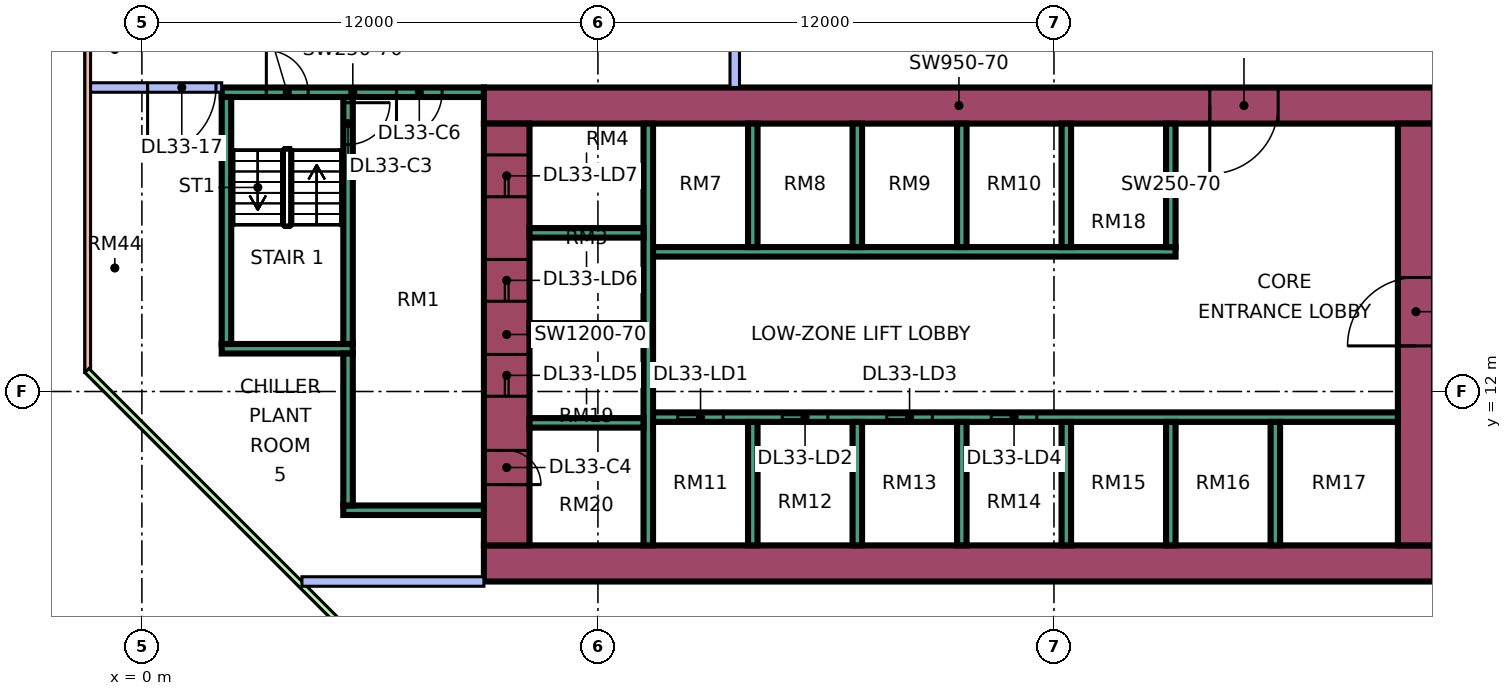
"""IFC4 building model, lengths in metres.
Left out: names, types, materials, properties, quantities, classifications, styles, units other than length and angle.
Written with IfcOpenShell. Run it as: python <this file> out.ifc"""

import sys

from ifc_helpers import new_model, si_unit, direction, frame, frame_2d, origin, place, context, subcontext, project, spatial, rectangle, extrude, element, fill, save


model = new_model("IFC4")
c1 = context("Model", 3, precision=1e-05, world=origin(), true_north=direction((0.0, 1.0)))
c2 = subcontext(c1, "Body", "Model", "MODEL_VIEW")
j1 = project(units=[si_unit("LENGTHUNIT", "METRE"), si_unit("PLANEANGLEUNIT", "RADIAN")], contexts=[c1])
p1 = place(None, origin())
s1 = spatial("IfcSite", under=j1, at=p1, CompositionType="ELEMENT")
p2 = place(p1, origin())
s2 = spatial("IfcBuilding", under=s1, at=p2, CompositionType="ELEMENT")
p3 = place(p2, frame((0.0, 0.0, 140.65)))
s3 = spatial("IfcBuildingStorey", under=s2, at=p3, CompositionType="ELEMENT", Elevation=140.65)
p4 = place(p3, frame((9.0, 7.475, 0.0), z_axis=(0.0, 0.0, 1.0), x_axis=(1.0, 0.0, 0.0)))
e1 = element("IfcWall", 1, at=p4, inside=s3, PredefinedType="SHEAR", context=c2, shape_type="SweptSolid", body=[
    extrude(rectangle(XDim=25.0, YDim=0.95, at=frame_2d((12.5, 0.0))), origin(), (0.0, 0.0, 1.0), 5.5),
])
p5 = place(p3, frame((9.0, 19.525, 0.0), z_axis=(0.0, 0.0, 1.0), x_axis=(1.0, 0.0, 0.0)))
e2 = element("IfcWall", 2, at=p5, inside=s3, PredefinedType="SHEAR", context=c2, shape_type="SweptSolid", body=[
    extrude(rectangle(XDim=25.0, YDim=0.95, at=frame_2d((12.5, 0.0))), origin(), (0.0, 0.0, 1.0), 5.5),
])
p6 = place(p5, frame((19.1, 0.0, 0.0)))
e3 = element("IfcOpeningElement", 3, at=p6, cuts=e2, PredefinedType="OPENING", context=c2, shape_type="SweptSolid", body=[
    extrude(rectangle(XDim=1.8, YDim=2.4, at=frame_2d((0.9, 1.2))), frame((0.0, 0.485, 0.0), z_axis=(0.0, -1.0, 0.0), x_axis=(1.0, 0.0, 0.0)), (0.0, 0.0, 1.0), 0.97),
])
p7 = place(p3, frame((9.6, 7.95, 0.0), z_axis=(0.0, 0.0, 1.0), x_axis=(0.0, 1.0, 0.0)))
e4 = element("IfcWall", 4, at=p7, inside=s3, PredefinedType="SHEAR", context=c2, shape_type="SweptSolid", body=[
    extrude(rectangle(XDim=11.1, YDim=1.2, at=frame_2d((5.55, 0.0))), origin(), (0.0, 0.0, 1.0), 5.5),
])
p8 = place(p7, frame((3.925, 0.0, 0.0)))
e5 = element("IfcOpeningElement", 5, at=p8, cuts=e4, PredefinedType="OPENING", context=c2, shape_type="SweptSolid", body=[
    extrude(rectangle(XDim=1.1, YDim=2.2, at=frame_2d((0.55, 1.1))), frame((0.0, 0.61, 0.0), z_axis=(0.0, -1.0, 0.0), x_axis=(1.0, 0.0, 0.0)), (0.0, 0.0, 1.0), 1.22),
])
p9 = place(p7, frame((6.425, 0.0, 0.0)))
e6 = element("IfcOpeningElement", 6, at=p9, cuts=e4, PredefinedType="OPENING", context=c2, shape_type="SweptSolid", body=[
    extrude(rectangle(XDim=1.1, YDim=2.2, at=frame_2d((0.55, 1.1))), frame((0.0, 0.61, 0.0), z_axis=(0.0, -1.0, 0.0), x_axis=(1.0, 0.0, 0.0)), (0.0, 0.0, 1.0), 1.22),
])
p10 = place(p7, frame((9.175, 0.0, 0.0)))
e7 = element("IfcOpeningElement", 7, at=p10, cuts=e4, PredefinedType="OPENING", context=c2, shape_type="SweptSolid", body=[
    extrude(rectangle(XDim=1.1, YDim=2.2, at=frame_2d((0.55, 1.1))), frame((0.0, 0.61, 0.0), z_axis=(0.0, -1.0, 0.0), x_axis=(1.0, 0.0, 0.0)), (0.0, 0.0, 1.0), 1.22),
])
p11 = place(p7, frame((1.6, 0.0, 0.0)))
e8 = element("IfcOpeningElement", 8, at=p11, cuts=e4, PredefinedType="OPENING", context=c2, shape_type="SweptSolid", body=[
    extrude(rectangle(XDim=0.9, YDim=2.1, at=frame_2d((0.45, 1.05))), frame((0.0, 0.61, 0.0), z_axis=(0.0, -1.0, 0.0), x_axis=(1.0, 0.0, 0.0)), (0.0, 0.0, 1.0), 1.22),
])
p12 = place(p3, frame((33.525, 7.95, 0.0), z_axis=(0.0, 0.0, 1.0), x_axis=(0.0, 1.0, 0.0)))
e9 = element("IfcWall", 9, at=p12, inside=s3, PredefinedType="SHEAR", context=c2, shape_type="SweptSolid", body=[
    extrude(rectangle(XDim=11.1, YDim=0.95, at=frame_2d((5.55, 0.0))), origin(), (0.0, 0.0, 1.0), 5.5),
])
p13 = place(p12, frame((5.25, 0.0, 0.0)))
e10 = element("IfcOpeningElement", 10, at=p13, cuts=e9, PredefinedType="OPENING", context=c2, shape_type="SweptSolid", body=[
    extrude(rectangle(XDim=1.8, YDim=2.4, at=frame_2d((0.9, 1.2))), frame((0.0, 0.485, 0.0), z_axis=(0.0, -1.0, 0.0), x_axis=(1.0, 0.0, 0.0)), (0.0, 0.0, 1.0), 0.97),
])
p14 = place(p3, frame((13.325, 7.95, 0.0), z_axis=(0.0, 0.0, 1.0), x_axis=(0.0, 1.0, 0.0)))
e11 = element("IfcWall", 11, at=p14, inside=s3, PredefinedType="SHEAR", context=c2, shape_type="SweptSolid", body=[
    extrude(rectangle(XDim=11.1, YDim=0.25, at=frame_2d((5.55, 0.0))), origin(), (0.0, 0.0, 1.0), 5.5),
])
p15 = place(p3, frame((13.45, 11.325, 0.0), z_axis=(0.0, 0.0, 1.0), x_axis=(1.0, 0.0, 0.0)))
e12 = element("IfcWall", 12, at=p15, inside=s3, PredefinedType="SHEAR", context=c2, shape_type="SweptSolid", body=[
    extrude(rectangle(XDim=19.6, YDim=0.25, at=frame_2d((9.8, 0.0))), origin(), (0.0, 0.0, 1.0), 5.5),
])
p16 = place(p15, frame((0.65, 0.0, 0.0)))
e13 = element("IfcOpeningElement", 13, at=p16, cuts=e12, PredefinedType="OPENING", context=c2, shape_type="SweptSolid", body=[
    extrude(rectangle(XDim=1.2, YDim=2.2, at=frame_2d((0.6, 1.1))), frame((0.0, 0.135, 0.0), z_axis=(0.0, -1.0, 0.0), x_axis=(1.0, 0.0, 0.0)), (0.0, 0.0, 1.0), 0.27),
])
p17 = place(p15, frame((3.4, 0.0, 0.0)))
e14 = element("IfcOpeningElement", 14, at=p17, cuts=e12, PredefinedType="OPENING", context=c2, shape_type="SweptSolid", body=[
    extrude(rectangle(XDim=1.2, YDim=2.2, at=frame_2d((0.6, 1.1))), frame((0.0, 0.135, 0.0), z_axis=(0.0, -1.0, 0.0), x_axis=(1.0, 0.0, 0.0)), (0.0, 0.0, 1.0), 0.27),
])
p18 = place(p15, frame((6.15, 0.0, 0.0)))
e15 = element("IfcOpeningElement", 15, at=p18, cuts=e12, PredefinedType="OPENING", context=c2, shape_type="SweptSolid", body=[
    extrude(rectangle(XDim=1.2, YDim=2.2, at=frame_2d((0.6, 1.1))), frame((0.0, 0.135, 0.0), z_axis=(0.0, -1.0, 0.0), x_axis=(1.0, 0.0, 0.0)), (0.0, 0.0, 1.0), 0.27),
])
p19 = place(p15, frame((8.9, 0.0, 0.0)))
e16 = element("IfcOpeningElement", 16, at=p19, cuts=e12, PredefinedType="OPENING", context=c2, shape_type="SweptSolid", body=[
    extrude(rectangle(XDim=1.2, YDim=2.2, at=frame_2d((0.6, 1.1))), frame((0.0, 0.135, 0.0), z_axis=(0.0, -1.0, 0.0), x_axis=(1.0, 0.0, 0.0)), (0.0, 0.0, 1.0), 0.27),
])
p20 = place(p3, frame((13.45, 15.675, 0.0), z_axis=(0.0, 0.0, 1.0), x_axis=(1.0, 0.0, 0.0)))
e17 = element("IfcWall", 17, at=p20, inside=s3, PredefinedType="SHEAR", context=c2, shape_type="SweptSolid", body=[
    extrude(rectangle(XDim=13.75, YDim=0.25, at=frame_2d((6.875, 0.0))), origin(), (0.0, 0.0, 1.0), 5.5),
])
for number, where, z_axis, x_axis in (
    (18, (10.2, 11.175, 0.0), (0.0, 0.0, 1.0), (1.0, 0.0, 0.0)),
    (19, (10.2, 13.675, 0.0), (0.0, 0.0, 1.0), (1.0, 0.0, 0.0)),
    (20, (10.2, 16.175, 0.0), (0.0, 0.0, 1.0), (1.0, 0.0, 0.0)),
):
    element("IfcWall", number, at=place(p3, frame(where, z_axis=z_axis, x_axis=x_axis)), inside=s3, PredefinedType="SHEAR", context=c2, shape_type="SweptSolid", body=[
        extrude(rectangle(XDim=3.0, YDim=0.25, at=frame_2d((1.5, 0.0))), origin(), (0.0, 0.0, 1.0), 5.5),
    ])
for number, where, z_axis, x_axis in (
    (21, (16.075, 7.95, 0.0), (0.0, 0.0, 1.0), (0.0, 1.0, 0.0)),
    (22, (18.825, 7.95, 0.0), (0.0, 0.0, 1.0), (0.0, 1.0, 0.0)),
    (23, (21.575, 7.95, 0.0), (0.0, 0.0, 1.0), (0.0, 1.0, 0.0)),
    (24, (24.325, 7.95, 0.0), (0.0, 0.0, 1.0), (0.0, 1.0, 0.0)),
    (25, (27.075, 7.95, 0.0), (0.0, 0.0, 1.0), (0.0, 1.0, 0.0)),
    (26, (29.825, 7.95, 0.0), (0.0, 0.0, 1.0), (0.0, 1.0, 0.0)),
    (27, (16.075, 15.8, 0.0), (0.0, 0.0, 1.0), (0.0, 1.0, 0.0)),
    (28, (18.825, 15.8, 0.0), (0.0, 0.0, 1.0), (0.0, 1.0, 0.0)),
    (29, (21.575, 15.8, 0.0), (0.0, 0.0, 1.0), (0.0, 1.0, 0.0)),
    (30, (24.325, 15.8, 0.0), (0.0, 0.0, 1.0), (0.0, 1.0, 0.0)),
    (31, (27.075, 15.8, 0.0), (0.0, 0.0, 1.0), (0.0, 1.0, 0.0)),
):
    element("IfcWall", number, at=place(p3, frame(where, z_axis=z_axis, x_axis=x_axis)), inside=s3, PredefinedType="SHEAR", context=c2, shape_type="SweptSolid", body=[
        extrude(rectangle(XDim=3.25, YDim=0.25, at=frame_2d((1.625, 0.0))), origin(), (0.0, 0.0, 1.0), 5.5),
    ])
p21 = place(p3, frame((2.1, 19.875, 0.0), z_axis=(0.0, 0.0, 1.0), x_axis=(1.0, 0.0, 0.0)))
e32 = element("IfcWall", 32, at=p21, inside=s3, PredefinedType="SHEAR", context=c2, shape_type="SweptSolid", body=[
    extrude(rectangle(XDim=6.9, YDim=0.25, at=frame_2d((3.45, 0.0))), origin(), (0.0, 0.0, 1.0), 5.5),
])
p22 = place(p21, frame((1.175, 0.0, 0.0)))
e33 = element("IfcOpeningElement", 33, at=p22, cuts=e32, PredefinedType="OPENING", context=c2, shape_type="SweptSolid", body=[
    extrude(rectangle(XDim=1.1, YDim=2.2, at=frame_2d((0.55, 1.1))), frame((0.0, 0.135, 0.0), z_axis=(0.0, -1.0, 0.0), x_axis=(1.0, 0.0, 0.0)), (0.0, 0.0, 1.0), 0.27),
])
p23 = place(p21, frame((4.6, 0.0, 0.0)))
e34 = element("IfcOpeningElement", 34, at=p23, cuts=e32, PredefinedType="OPENING", context=c2, shape_type="SweptSolid", body=[
    extrude(rectangle(XDim=1.2, YDim=2.2, at=frame_2d((0.6, 1.1))), frame((0.0, 0.135, 0.0), z_axis=(0.0, -1.0, 0.0), x_axis=(1.0, 0.0, 0.0)), (0.0, 0.0, 1.0), 0.27),
])
p24 = place(p3, frame((2.1, 13.125, 0.0), z_axis=(0.0, 0.0, 1.0), x_axis=(1.0, 0.0, 0.0)))
e35 = element("IfcWall", 35, at=p24, inside=s3, PredefinedType="SHEAR", context=c2, shape_type="SweptSolid", body=[
    extrude(rectangle(XDim=3.45, YDim=0.25, at=frame_2d((1.725, 0.0))), origin(), (0.0, 0.0, 1.0), 5.5),
])
p25 = place(p3, frame((2.225, 13.25, 0.0), z_axis=(0.0, 0.0, 1.0), x_axis=(0.0, 1.0, 0.0)))
e36 = element("IfcWall", 36, at=p25, inside=s3, PredefinedType="SHEAR", context=c2, shape_type="SweptSolid", body=[
    extrude(rectangle(XDim=6.5, YDim=0.25, at=frame_2d((3.25, 0.0))), origin(), (0.0, 0.0, 1.0), 5.5),
])
p26 = place(p3, frame((5.425, 13.25, 0.0), z_axis=(0.0, 0.0, 1.0), x_axis=(0.0, 1.0, 0.0)))
e37 = element("IfcWall", 37, at=p26, inside=s3, PredefinedType="SHEAR", context=c2, shape_type="SweptSolid", body=[
    extrude(rectangle(XDim=6.5, YDim=0.25, at=frame_2d((3.25, 0.0))), origin(), (0.0, 0.0, 1.0), 5.5),
])
p27 = place(p26, frame((5.25, 0.0, 0.0)))
e38 = element("IfcOpeningElement", 38, at=p27, cuts=e37, PredefinedType="OPENING", context=c2, shape_type="SweptSolid", body=[
    extrude(rectangle(XDim=1.1, YDim=2.2, at=frame_2d((0.55, 1.1))), frame((0.0, 0.135, 0.0), z_axis=(0.0, -1.0, 0.0), x_axis=(1.0, 0.0, 0.0)), (0.0, 0.0, 1.0), 0.27),
])
p28 = place(p3, frame((5.3, 8.875, 0.0), z_axis=(0.0, 0.0, 1.0), x_axis=(1.0, 0.0, 0.0)))
e39 = element("IfcWall", 39, at=p28, inside=s3, PredefinedType="SHEAR", context=c2, shape_type="SweptSolid", body=[
    extrude(rectangle(XDim=3.7, YDim=0.25, at=frame_2d((1.85, 0.0))), origin(), (0.0, 0.0, 1.0), 5.5),
])
p29 = place(p3, frame((5.425, 9.0, 0.0), z_axis=(0.0, 0.0, 1.0), x_axis=(0.0, 1.0, 0.0)))
e40 = element("IfcWall", 40, at=p29, inside=s3, PredefinedType="SHEAR", context=c2, shape_type="SweptSolid", body=[
    extrude(rectangle(XDim=4.0, YDim=0.25, at=frame_2d((2.0, 0.0))), origin(), (0.0, 0.0, 1.0), 5.5),
])
p30 = place(p3, frame((-1.425, 23.925, 0.0), z_axis=(0.0, 0.0, 1.0), x_axis=(0.0, -1.0, 0.0)))
e41 = element("IfcWall", 41, at=p30, inside=s3, PredefinedType="SOLIDWALL", context=c2, shape_type="SweptSolid", body=[
    extrude(rectangle(XDim=11.425, YDim=0.15, at=frame_2d((5.712, 0.0))), origin(), (0.0, 0.0, 1.0), 5.05),
])
p31 = place(p3, frame((-1.447, 12.553, 0.0), z_axis=(0.0, 0.0, 1.0), x_axis=(0.707106781187, -0.707106781187, 0.0)))
e42 = element("IfcWall", 42, at=p31, inside=s3, PredefinedType="SOLIDWALL", context=c2, shape_type="SweptSolid", body=[
    extrude(rectangle(XDim=19.799, YDim=0.15, at=frame_2d((9.899, 0.0))), origin(), (0.0, 0.0, 1.0), 5.05),
])
p32 = place(p31, frame((11.453, 0.0, 0.45)))
e43 = element("IfcOpeningElement", 43, at=p32, cuts=e42, PredefinedType="OPENING", context=c2, shape_type="SweptSolid", body=[
    extrude(rectangle(XDim=3.0, YDim=3.6, at=frame_2d((1.5, 1.8))), frame((0.0, 0.085, 0.0), z_axis=(0.0, -1.0, 0.0), x_axis=(1.0, 0.0, 0.0)), (0.0, 0.0, 1.0), 0.17),
])
p33 = place(p3, frame((-1.35, 20.0, 0.0), z_axis=(0.0, 0.0, 1.0), x_axis=(1.0, 0.0, 0.0)))
e44 = element("IfcWall", 44, at=p33, inside=s3, PredefinedType="PARTITIONING", context=c2, shape_type="SweptSolid", body=[
    extrude(rectangle(XDim=3.45, YDim=0.25, at=frame_2d((1.725, 0.0))), origin(), (0.0, 0.0, 1.0), 5.05),
])
p34 = place(p33, frame((1.5, 0.0, 0.0)))
e45 = element("IfcOpeningElement", 45, at=p34, cuts=e44, PredefinedType="OPENING", context=c2, shape_type="SweptSolid", body=[
    extrude(rectangle(XDim=1.8, YDim=2.1, at=frame_2d((0.9, 1.05))), frame((0.0, 0.135, 0.0), z_axis=(0.0, -1.0, 0.0), x_axis=(1.0, 0.0, 0.0)), (0.0, 0.0, 1.0), 0.27),
])
p35 = place(p3, frame((4.211, 7.0, 0.0), z_axis=(0.0, 0.0, 1.0), x_axis=(1.0, 0.0, 0.0)))
e46 = element("IfcWall", 46, at=p35, inside=s3, PredefinedType="PARTITIONING", context=c2, shape_type="SweptSolid", body=[
    extrude(rectangle(XDim=4.789, YDim=0.25, at=frame_2d((2.395, 0.0))), origin(), (0.0, 0.0, 1.0), 5.05),
])
p36 = place(p3, frame((15.6, 20.0, 0.0), z_axis=(0.0, 0.0, 1.0), x_axis=(0.0, 1.0, 0.0)))
e47 = element("IfcWall", 47, at=p36, inside=s3, PredefinedType="PARTITIONING", context=c2, shape_type="SweptSolid", body=[
    extrude(rectangle(XDim=27.775, YDim=0.25, at=frame_2d((13.887, 0.0))), origin(), (0.0, 0.0, 1.0), 5.05),
])
p37 = place(p36, frame((19.15, 0.0, 0.0)))
e48 = element("IfcOpeningElement", 48, at=p37, cuts=e47, PredefinedType="OPENING", context=c2, shape_type="SweptSolid", body=[
    extrude(rectangle(XDim=1.8, YDim=2.1, at=frame_2d((0.9, 1.05))), frame((0.0, 0.135, 0.0), z_axis=(0.0, -1.0, 0.0), x_axis=(1.0, 0.0, 0.0)), (0.0, 0.0, 1.0), 0.27),
])
p38 = place(p36, frame((24.9, 0.0, 0.0)))
e49 = element("IfcOpeningElement", 49, at=p38, cuts=e47, PredefinedType="OPENING", context=c2, shape_type="SweptSolid", body=[
    extrude(rectangle(XDim=1.8, YDim=2.1, at=frame_2d((0.9, 1.05))), frame((0.0, 0.135, 0.0), z_axis=(0.0, -1.0, 0.0), x_axis=(1.0, 0.0, 0.0)), (0.0, 0.0, 1.0), 0.27),
])
p39 = place(p36, frame((14.65, 0.0, 0.0)))
e50 = element("IfcOpeningElement", 50, at=p39, cuts=e47, PredefinedType="OPENING", context=c2, shape_type="SweptSolid", body=[
    extrude(rectangle(XDim=0.9, YDim=2.1, at=frame_2d((0.45, 1.05))), frame((0.0, 0.135, 0.0), z_axis=(0.0, -1.0, 0.0), x_axis=(1.0, 0.0, 0.0)), (0.0, 0.0, 1.0), 0.27),
])
p40 = place(p36, frame((11.4, 0.0, 0.0)))
e51 = element("IfcOpeningElement", 51, at=p40, cuts=e47, PredefinedType="OPENING", context=c2, shape_type="SweptSolid", body=[
    extrude(rectangle(XDim=0.9, YDim=2.1, at=frame_2d((0.45, 1.05))), frame((0.0, 0.135, 0.0), z_axis=(0.0, -1.0, 0.0), x_axis=(1.0, 0.0, 0.0)), (0.0, 0.0, 1.0), 0.27),
])
p41 = place(p16, origin())
e52 = element("IfcDoor", 52, at=p41, inside=s3, OperationType="DOUBLE_DOOR_SLIDING", PredefinedType="DOOR", context=c2, shape_type="SweptSolid", body=[
    extrude(rectangle(XDim=1.2, YDim=2.2, at=frame_2d((0.6, 1.1))), frame((0.0, 0.025, 0.0), z_axis=(0.0, -1.0, 0.0), x_axis=(1.0, 0.0, 0.0)), (0.0, 0.0, 1.0), 0.05),
])
fill(e13, e52)
p42 = place(p17, origin())
e53 = element("IfcDoor", 53, at=p42, inside=s3, OperationType="DOUBLE_DOOR_SLIDING", PredefinedType="DOOR", context=c2, shape_type="SweptSolid", body=[
    extrude(rectangle(XDim=1.2, YDim=2.2, at=frame_2d((0.6, 1.1))), frame((0.0, 0.025, 0.0), z_axis=(0.0, -1.0, 0.0), x_axis=(1.0, 0.0, 0.0)), (0.0, 0.0, 1.0), 0.05),
])
fill(e14, e53)
p43 = place(p18, origin())
e54 = element("IfcDoor", 54, at=p43, inside=s3, OperationType="DOUBLE_DOOR_SLIDING", PredefinedType="DOOR", context=c2, shape_type="SweptSolid", body=[
    extrude(rectangle(XDim=1.2, YDim=2.2, at=frame_2d((0.6, 1.1))), frame((0.0, 0.025, 0.0), z_axis=(0.0, -1.0, 0.0), x_axis=(1.0, 0.0, 0.0)), (0.0, 0.0, 1.0), 0.05),
])
fill(e15, e54)
p44 = place(p19, origin())
e55 = element("IfcDoor", 55, at=p44, inside=s3, OperationType="DOUBLE_DOOR_SLIDING", PredefinedType="DOOR", context=c2, shape_type="SweptSolid", body=[
    extrude(rectangle(XDim=1.2, YDim=2.2, at=frame_2d((0.6, 1.1))), frame((0.0, 0.025, 0.0), z_axis=(0.0, -1.0, 0.0), x_axis=(1.0, 0.0, 0.0)), (0.0, 0.0, 1.0), 0.05),
])
fill(e16, e55)
p45 = place(p8, origin())
e56 = element("IfcDoor", 56, at=p45, inside=s3, OperationType="DOUBLE_DOOR_SLIDING", PredefinedType="DOOR", context=c2, shape_type="SweptSolid", body=[
    extrude(rectangle(XDim=1.1, YDim=2.2, at=frame_2d((0.55, 1.1))), frame((0.0, 0.025, 0.0), z_axis=(0.0, -1.0, 0.0), x_axis=(1.0, 0.0, 0.0)), (0.0, 0.0, 1.0), 0.05),
])
fill(e5, e56)
p46 = place(p9, origin())
e57 = element("IfcDoor", 57, at=p46, inside=s3, OperationType="DOUBLE_DOOR_SLIDING", PredefinedType="DOOR", context=c2, shape_type="SweptSolid", body=[
    extrude(rectangle(XDim=1.1, YDim=2.2, at=frame_2d((0.55, 1.1))), frame((0.0, 0.025, 0.0), z_axis=(0.0, -1.0, 0.0), x_axis=(1.0, 0.0, 0.0)), (0.0, 0.0, 1.0), 0.05),
])
fill(e6, e57)
p47 = place(p10, origin())
e58 = element("IfcDoor", 58, at=p47, inside=s3, OperationType="DOUBLE_DOOR_SLIDING", PredefinedType="DOOR", context=c2, shape_type="SweptSolid", body=[
    extrude(rectangle(XDim=1.1, YDim=2.2, at=frame_2d((0.55, 1.1))), frame((0.0, 0.025, 0.0), z_axis=(0.0, -1.0, 0.0), x_axis=(1.0, 0.0, 0.0)), (0.0, 0.0, 1.0), 0.05),
])
fill(e7, e58)
p48 = place(p13, origin())
e59 = element("IfcDoor", 59, at=p48, inside=s3, OperationType="DOUBLE_DOOR_SINGLE_SWING", PredefinedType="DOOR", context=c2, shape_type="SweptSolid", body=[
    extrude(rectangle(XDim=1.8, YDim=2.4, at=frame_2d((0.9, 1.2))), frame((0.0, 0.025, 0.0), z_axis=(0.0, -1.0, 0.0), x_axis=(1.0, 0.0, 0.0)), (0.0, 0.0, 1.0), 0.05),
])
fill(e10, e59)
p49 = place(p6, frame((1.8, 0.0, 0.0), z_axis=(0.0, 0.0, 1.0), x_axis=(-1.0, 0.0, 0.0)))
e60 = element("IfcDoor", 60, at=p49, inside=s3, OperationType="DOUBLE_DOOR_SINGLE_SWING", PredefinedType="DOOR", context=c2, shape_type="SweptSolid", body=[
    extrude(rectangle(XDim=1.8, YDim=2.4, at=frame_2d((0.9, 1.2))), frame((0.0, 0.025, 0.0), z_axis=(0.0, -1.0, 0.0), x_axis=(1.0, 0.0, 0.0)), (0.0, 0.0, 1.0), 0.05),
])
fill(e3, e60)
p50 = place(p27, origin())
e61 = element("IfcDoor", 61, at=p50, inside=s3, OperationType="SINGLE_SWING_RIGHT", PredefinedType="DOOR", context=c2, shape_type="SweptSolid", body=[
    extrude(rectangle(XDim=1.1, YDim=2.2, at=frame_2d((0.55, 1.1))), frame((0.0, 0.025, 0.0), z_axis=(0.0, -1.0, 0.0), x_axis=(1.0, 0.0, 0.0)), (0.0, 0.0, 1.0), 0.05),
])
fill(e38, e61)
p51 = place(p11, frame((0.9, 0.0, 0.0), z_axis=(0.0, 0.0, 1.0), x_axis=(-1.0, 0.0, 0.0)))
e62 = element("IfcDoor", 62, at=p51, inside=s3, OperationType="SINGLE_SWING_LEFT", PredefinedType="DOOR", context=c2, shape_type="SweptSolid", body=[
    extrude(rectangle(XDim=0.9, YDim=2.1, at=frame_2d((0.45, 1.05))), frame((0.0, 0.025, 0.0), z_axis=(0.0, -1.0, 0.0), x_axis=(1.0, 0.0, 0.0)), (0.0, 0.0, 1.0), 0.05),
])
fill(e8, e62)
p52 = place(p22, origin())
e63 = element("IfcDoor", 63, at=p52, inside=s3, OperationType="SINGLE_SWING_LEFT", PredefinedType="DOOR", context=c2, shape_type="SweptSolid", body=[
    extrude(rectangle(XDim=1.1, YDim=2.2, at=frame_2d((0.55, 1.1))), frame((0.0, 0.025, 0.0), z_axis=(0.0, -1.0, 0.0), x_axis=(1.0, 0.0, 0.0)), (0.0, 0.0, 1.0), 0.05),
])
fill(e33, e63)
p53 = place(p23, frame((1.2, 0.0, 0.0), z_axis=(0.0, 0.0, 1.0), x_axis=(-1.0, 0.0, 0.0)))
e64 = element("IfcDoor", 64, at=p53, inside=s3, OperationType="SINGLE_SWING_LEFT", PredefinedType="DOOR", context=c2, shape_type="SweptSolid", body=[
    extrude(rectangle(XDim=1.2, YDim=2.2, at=frame_2d((0.6, 1.1))), frame((0.0, 0.025, 0.0), z_axis=(0.0, -1.0, 0.0), x_axis=(1.0, 0.0, 0.0)), (0.0, 0.0, 1.0), 0.05),
])
fill(e34, e64)
p54 = place(p34, frame((1.8, 0.0, 0.0), z_axis=(0.0, 0.0, 1.0), x_axis=(-1.0, 0.0, 0.0)))
e65 = element("IfcDoor", 65, at=p54, inside=s3, OperationType="DOUBLE_DOOR_SINGLE_SWING", PredefinedType="DOOR", context=c2, shape_type="SweptSolid", body=[
    extrude(rectangle(XDim=1.8, YDim=2.1, at=frame_2d((0.9, 1.05))), frame((0.0, 0.025, 0.0), z_axis=(0.0, -1.0, 0.0), x_axis=(1.0, 0.0, 0.0)), (0.0, 0.0, 1.0), 0.05),
])
fill(e45, e65)
save(model, sys.argv[1])
